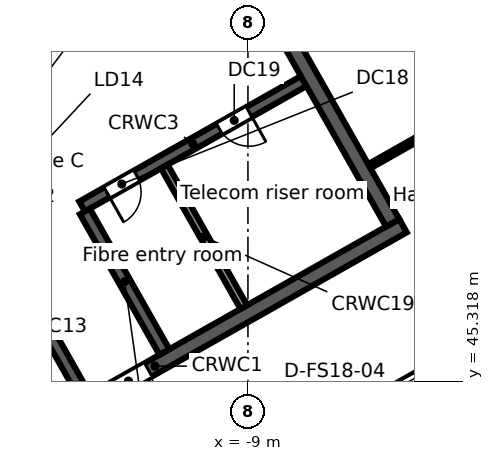
"""IFC4 building model, lengths in metres.
Left out: names, types, materials, properties, quantities, classifications, styles, units other than length and angle.
Written with IfcOpenShell. Run it as: python <this file> out.ifc"""

import sys

from ifc_helpers import new_model, si_unit, direction, frame, frame_2d, origin, place, context, subcontext, project, spatial, rectangle, extrude, element, fill, save


model = new_model("IFC4")
c1 = context("Model", 3, precision=1e-05, world=origin(), true_north=direction((0.0, 1.0)))
c2 = subcontext(c1, "Body", "Model", "MODEL_VIEW")
j1 = project(units=[si_unit("LENGTHUNIT", "METRE"), si_unit("PLANEANGLEUNIT", "RADIAN")], contexts=[c1])
p1 = place(None, origin())
s1 = spatial("IfcSite", under=j1, at=p1, CompositionType="ELEMENT")
p2 = place(p1, origin())
s2 = spatial("IfcBuilding", under=s1, at=p2, CompositionType="ELEMENT")
p3 = place(p2, frame((0.0, 0.0, 266.5)))
s3 = spatial("IfcBuildingStorey", under=s2, at=p3, CompositionType="ELEMENT", Elevation=266.5)
p4 = place(p3, frame((-58.732, 38.771, 0.0), z_axis=(0.0, 0.0, 1.0), x_axis=(0.870355615581, 0.492423702137, 0.0)))
e1 = element("IfcWall", 1, at=p4, inside=s3, PredefinedType="STANDARD", context=c2, shape_type="SweptSolid", body=[
    extrude(rectangle(XDim=64.052, YDim=0.25, at=frame_2d((32.026, 0.0))), origin(), (0.0, 0.0, 1.0), 3.52),
])
p5 = place(p4, frame((61.259, 0.0, 0.8)))
e2 = element("IfcOpeningElement", 2, at=p5, cuts=e1, PredefinedType="OPENING", context=c2, shape_type="SweptSolid", body=[
    extrude(rectangle(XDim=2.4, YDim=2.2, at=frame_2d((1.2, 1.1))), frame((0.0, 0.135, 0.0), z_axis=(0.0, -1.0, 0.0), x_axis=(1.0, 0.0, 0.0)), (0.0, 0.0, 1.0), 0.27),
])
p6 = place(p4, frame((58.216, 0.0, 0.8)))
e3 = element("IfcOpeningElement", 3, at=p6, cuts=e1, PredefinedType="OPENING", context=c2, shape_type="SweptSolid", body=[
    extrude(rectangle(XDim=2.4, YDim=2.2, at=frame_2d((1.2, 1.1))), frame((0.0, 0.135, 0.0), z_axis=(0.0, -1.0, 0.0), x_axis=(1.0, 0.0, 0.0)), (0.0, 0.0, 1.0), 0.27),
])
p7 = place(p4, frame((55.173, 0.0, 0.8)))
e4 = element("IfcOpeningElement", 4, at=p7, cuts=e1, PredefinedType="OPENING", context=c2, shape_type="SweptSolid", body=[
    extrude(rectangle(XDim=2.4, YDim=2.2, at=frame_2d((1.2, 1.1))), frame((0.0, 0.135, 0.0), z_axis=(0.0, -1.0, 0.0), x_axis=(1.0, 0.0, 0.0)), (0.0, 0.0, 1.0), 0.27),
])
p8 = place(p4, frame((52.129, 0.0, 0.8)))
e5 = element("IfcOpeningElement", 5, at=p8, cuts=e1, PredefinedType="OPENING", context=c2, shape_type="SweptSolid", body=[
    extrude(rectangle(XDim=2.4, YDim=2.2, at=frame_2d((1.2, 1.1))), frame((0.0, 0.135, 0.0), z_axis=(0.0, -1.0, 0.0), x_axis=(1.0, 0.0, 0.0)), (0.0, 0.0, 1.0), 0.27),
])
p9 = place(p4, frame((49.086, 0.0, 0.8)))
e6 = element("IfcOpeningElement", 6, at=p9, cuts=e1, PredefinedType="OPENING", context=c2, shape_type="SweptSolid", body=[
    extrude(rectangle(XDim=2.4, YDim=2.2, at=frame_2d((1.2, 1.1))), frame((0.0, 0.135, 0.0), z_axis=(0.0, -1.0, 0.0), x_axis=(1.0, 0.0, 0.0)), (0.0, 0.0, 1.0), 0.27),
])
p10 = place(p4, frame((46.043, 0.0, 0.8)))
e7 = element("IfcOpeningElement", 7, at=p10, cuts=e1, PredefinedType="OPENING", context=c2, shape_type="SweptSolid", body=[
    extrude(rectangle(XDim=2.4, YDim=2.2, at=frame_2d((1.2, 1.1))), frame((0.0, 0.135, 0.0), z_axis=(0.0, -1.0, 0.0), x_axis=(1.0, 0.0, 0.0)), (0.0, 0.0, 1.0), 0.27),
])
p11 = place(p4, frame((43.0, 0.0, 0.8)))
e8 = element("IfcOpeningElement", 8, at=p11, cuts=e1, PredefinedType="OPENING", context=c2, shape_type="SweptSolid", body=[
    extrude(rectangle(XDim=2.4, YDim=2.2, at=frame_2d((1.2, 1.1))), frame((0.0, 0.135, 0.0), z_axis=(0.0, -1.0, 0.0), x_axis=(1.0, 0.0, 0.0)), (0.0, 0.0, 1.0), 0.27),
])
p12 = place(p4, frame((39.956, 0.0, 0.8)))
e9 = element("IfcOpeningElement", 9, at=p12, cuts=e1, PredefinedType="OPENING", context=c2, shape_type="SweptSolid", body=[
    extrude(rectangle(XDim=2.4, YDim=2.2, at=frame_2d((1.2, 1.1))), frame((0.0, 0.135, 0.0), z_axis=(0.0, -1.0, 0.0), x_axis=(1.0, 0.0, 0.0)), (0.0, 0.0, 1.0), 0.27),
])
p13 = place(p4, frame((36.913, 0.0, 0.8)))
e10 = element("IfcOpeningElement", 10, at=p13, cuts=e1, PredefinedType="OPENING", context=c2, shape_type="SweptSolid", body=[
    extrude(rectangle(XDim=2.4, YDim=2.2, at=frame_2d((1.2, 1.1))), frame((0.0, 0.135, 0.0), z_axis=(0.0, -1.0, 0.0), x_axis=(1.0, 0.0, 0.0)), (0.0, 0.0, 1.0), 0.27),
])
p14 = place(p4, frame((33.87, 0.0, 0.8)))
e11 = element("IfcOpeningElement", 11, at=p14, cuts=e1, PredefinedType="OPENING", context=c2, shape_type="SweptSolid", body=[
    extrude(rectangle(XDim=2.4, YDim=2.2, at=frame_2d((1.2, 1.1))), frame((0.0, 0.135, 0.0), z_axis=(0.0, -1.0, 0.0), x_axis=(1.0, 0.0, 0.0)), (0.0, 0.0, 1.0), 0.27),
])
p15 = place(p4, frame((30.826, 0.0, 0.8)))
e12 = element("IfcOpeningElement", 12, at=p15, cuts=e1, PredefinedType="OPENING", context=c2, shape_type="SweptSolid", body=[
    extrude(rectangle(XDim=2.4, YDim=2.2, at=frame_2d((1.2, 1.1))), frame((0.0, 0.135, 0.0), z_axis=(0.0, -1.0, 0.0), x_axis=(1.0, 0.0, 0.0)), (0.0, 0.0, 1.0), 0.27),
])
p16 = place(p4, frame((27.783, 0.0, 0.8)))
e13 = element("IfcOpeningElement", 13, at=p16, cuts=e1, PredefinedType="OPENING", context=c2, shape_type="SweptSolid", body=[
    extrude(rectangle(XDim=2.4, YDim=2.2, at=frame_2d((1.2, 1.1))), frame((0.0, 0.135, 0.0), z_axis=(0.0, -1.0, 0.0), x_axis=(1.0, 0.0, 0.0)), (0.0, 0.0, 1.0), 0.27),
])
p17 = place(p4, frame((24.74, 0.0, 0.8)))
e14 = element("IfcOpeningElement", 14, at=p17, cuts=e1, PredefinedType="OPENING", context=c2, shape_type="SweptSolid", body=[
    extrude(rectangle(XDim=2.4, YDim=2.2, at=frame_2d((1.2, 1.1))), frame((0.0, 0.135, 0.0), z_axis=(0.0, -1.0, 0.0), x_axis=(1.0, 0.0, 0.0)), (0.0, 0.0, 1.0), 0.27),
])
p18 = place(p4, frame((21.696, 0.0, 0.8)))
e15 = element("IfcOpeningElement", 15, at=p18, cuts=e1, PredefinedType="OPENING", context=c2, shape_type="SweptSolid", body=[
    extrude(rectangle(XDim=2.4, YDim=2.2, at=frame_2d((1.2, 1.1))), frame((0.0, 0.135, 0.0), z_axis=(0.0, -1.0, 0.0), x_axis=(1.0, 0.0, 0.0)), (0.0, 0.0, 1.0), 0.27),
])
p19 = place(p4, frame((18.653, 0.0, 0.8)))
e16 = element("IfcOpeningElement", 16, at=p19, cuts=e1, PredefinedType="OPENING", context=c2, shape_type="SweptSolid", body=[
    extrude(rectangle(XDim=2.4, YDim=2.2, at=frame_2d((1.2, 1.1))), frame((0.0, 0.135, 0.0), z_axis=(0.0, -1.0, 0.0), x_axis=(1.0, 0.0, 0.0)), (0.0, 0.0, 1.0), 0.27),
])
p20 = place(p4, frame((15.61, 0.0, 0.8)))
e17 = element("IfcOpeningElement", 17, at=p20, cuts=e1, PredefinedType="OPENING", context=c2, shape_type="SweptSolid", body=[
    extrude(rectangle(XDim=2.4, YDim=2.2, at=frame_2d((1.2, 1.1))), frame((0.0, 0.135, 0.0), z_axis=(0.0, -1.0, 0.0), x_axis=(1.0, 0.0, 0.0)), (0.0, 0.0, 1.0), 0.27),
])
p21 = place(p4, frame((12.567, 0.0, 0.8)))
e18 = element("IfcOpeningElement", 18, at=p21, cuts=e1, PredefinedType="OPENING", context=c2, shape_type="SweptSolid", body=[
    extrude(rectangle(XDim=2.4, YDim=2.2, at=frame_2d((1.2, 1.1))), frame((0.0, 0.135, 0.0), z_axis=(0.0, -1.0, 0.0), x_axis=(1.0, 0.0, 0.0)), (0.0, 0.0, 1.0), 0.27),
])
p22 = place(p4, frame((9.523, 0.0, 0.8)))
e19 = element("IfcOpeningElement", 19, at=p22, cuts=e1, PredefinedType="OPENING", context=c2, shape_type="SweptSolid", body=[
    extrude(rectangle(XDim=2.4, YDim=2.2, at=frame_2d((1.2, 1.1))), frame((0.0, 0.135, 0.0), z_axis=(0.0, -1.0, 0.0), x_axis=(1.0, 0.0, 0.0)), (0.0, 0.0, 1.0), 0.27),
])
p23 = place(p4, frame((6.48, 0.0, 0.8)))
e20 = element("IfcOpeningElement", 20, at=p23, cuts=e1, PredefinedType="OPENING", context=c2, shape_type="SweptSolid", body=[
    extrude(rectangle(XDim=2.4, YDim=2.2, at=frame_2d((1.2, 1.1))), frame((0.0, 0.135, 0.0), z_axis=(0.0, -1.0, 0.0), x_axis=(1.0, 0.0, 0.0)), (0.0, 0.0, 1.0), 0.27),
])
p24 = place(p4, frame((3.437, 0.0, 0.8)))
e21 = element("IfcOpeningElement", 21, at=p24, cuts=e1, PredefinedType="OPENING", context=c2, shape_type="SweptSolid", body=[
    extrude(rectangle(XDim=2.4, YDim=2.2, at=frame_2d((1.2, 1.1))), frame((0.0, 0.135, 0.0), z_axis=(0.0, -1.0, 0.0), x_axis=(1.0, 0.0, 0.0)), (0.0, 0.0, 1.0), 0.27),
])
p25 = place(p4, frame((0.393, 0.0, 0.8)))
e22 = element("IfcOpeningElement", 22, at=p25, cuts=e1, PredefinedType="OPENING", context=c2, shape_type="SweptSolid", body=[
    extrude(rectangle(XDim=2.4, YDim=2.2, at=frame_2d((1.2, 1.1))), frame((0.0, 0.135, 0.0), z_axis=(0.0, -1.0, 0.0), x_axis=(1.0, 0.0, 0.0)), (0.0, 0.0, 1.0), 0.27),
])
p26 = place(p3, frame((-3.017, 46.293, 0.0), z_axis=(0.0, 0.0, 1.0), x_axis=(-0.870355474887, -0.492423950812, 0.0)))
e23 = element("IfcWall", 23, at=p26, inside=s3, PredefinedType="STANDARD", context=c2, shape_type="SweptSolid", body=[
    extrude(rectangle(XDim=40.34, YDim=0.25, at=frame_2d((20.17, 0.0))), origin(), (0.0, 0.0, 1.0), 3.52),
])
p27 = place(p26, frame((37.428, 0.0, 0.8)))
e24 = element("IfcOpeningElement", 24, at=p27, cuts=e23, PredefinedType="OPENING", context=c2, shape_type="SweptSolid", body=[
    extrude(rectangle(XDim=2.4, YDim=2.2, at=frame_2d((1.2, 1.1))), frame((0.0, 0.135, 0.0), z_axis=(0.0, -1.0, 0.0), x_axis=(1.0, 0.0, 0.0)), (0.0, 0.0, 1.0), 0.27),
])
p28 = place(p26, frame((34.372, 0.0, 0.0)))
e25 = element("IfcOpeningElement", 25, at=p28, cuts=e23, PredefinedType="OPENING", context=c2, shape_type="SweptSolid", body=[
    extrude(rectangle(XDim=1.8, YDim=2.4, at=frame_2d((0.9, 1.2))), frame((0.0, 0.135, 0.0), z_axis=(0.0, -1.0, 0.0), x_axis=(1.0, 0.0, 0.0)), (0.0, 0.0, 1.0), 0.27),
])
p29 = place(p26, frame((30.716, 0.0, 0.8)))
e26 = element("IfcOpeningElement", 26, at=p29, cuts=e23, PredefinedType="OPENING", context=c2, shape_type="SweptSolid", body=[
    extrude(rectangle(XDim=2.4, YDim=2.2, at=frame_2d((1.2, 1.1))), frame((0.0, 0.135, 0.0), z_axis=(0.0, -1.0, 0.0), x_axis=(1.0, 0.0, 0.0)), (0.0, 0.0, 1.0), 0.27),
])
p30 = place(p26, frame((27.36, 0.0, 0.8)))
e27 = element("IfcOpeningElement", 27, at=p30, cuts=e23, PredefinedType="OPENING", context=c2, shape_type="SweptSolid", body=[
    extrude(rectangle(XDim=2.4, YDim=2.2, at=frame_2d((1.2, 1.1))), frame((0.0, 0.135, 0.0), z_axis=(0.0, -1.0, 0.0), x_axis=(1.0, 0.0, 0.0)), (0.0, 0.0, 1.0), 0.27),
])
p31 = place(p26, frame((24.304, 0.0, 0.0)))
e28 = element("IfcOpeningElement", 28, at=p31, cuts=e23, PredefinedType="OPENING", context=c2, shape_type="SweptSolid", body=[
    extrude(rectangle(XDim=1.8, YDim=2.4, at=frame_2d((0.9, 1.2))), frame((0.0, 0.135, 0.0), z_axis=(0.0, -1.0, 0.0), x_axis=(1.0, 0.0, 0.0)), (0.0, 0.0, 1.0), 0.27),
])
p32 = place(p26, frame((20.648, 0.0, 0.8)))
e29 = element("IfcOpeningElement", 29, at=p32, cuts=e23, PredefinedType="OPENING", context=c2, shape_type="SweptSolid", body=[
    extrude(rectangle(XDim=2.4, YDim=2.2, at=frame_2d((1.2, 1.1))), frame((0.0, 0.135, 0.0), z_axis=(0.0, -1.0, 0.0), x_axis=(1.0, 0.0, 0.0)), (0.0, 0.0, 1.0), 0.27),
])
p33 = place(p26, frame((17.292, 0.0, 0.8)))
e30 = element("IfcOpeningElement", 30, at=p33, cuts=e23, PredefinedType="OPENING", context=c2, shape_type="SweptSolid", body=[
    extrude(rectangle(XDim=2.4, YDim=2.2, at=frame_2d((1.2, 1.1))), frame((0.0, 0.135, 0.0), z_axis=(0.0, -1.0, 0.0), x_axis=(1.0, 0.0, 0.0)), (0.0, 0.0, 1.0), 0.27),
])
p34 = place(p26, frame((14.236, 0.0, 0.0)))
e31 = element("IfcOpeningElement", 31, at=p34, cuts=e23, PredefinedType="OPENING", context=c2, shape_type="SweptSolid", body=[
    extrude(rectangle(XDim=1.8, YDim=2.4, at=frame_2d((0.9, 1.2))), frame((0.0, 0.135, 0.0), z_axis=(0.0, -1.0, 0.0), x_axis=(1.0, 0.0, 0.0)), (0.0, 0.0, 1.0), 0.27),
])
p35 = place(p26, frame((10.58, 0.0, 0.8)))
e32 = element("IfcOpeningElement", 32, at=p35, cuts=e23, PredefinedType="OPENING", context=c2, shape_type="SweptSolid", body=[
    extrude(rectangle(XDim=2.4, YDim=2.2, at=frame_2d((1.2, 1.1))), frame((0.0, 0.135, 0.0), z_axis=(0.0, -1.0, 0.0), x_axis=(1.0, 0.0, 0.0)), (0.0, 0.0, 1.0), 0.27),
])
p36 = place(p26, frame((7.224, 0.0, 0.8)))
e33 = element("IfcOpeningElement", 33, at=p36, cuts=e23, PredefinedType="OPENING", context=c2, shape_type="SweptSolid", body=[
    extrude(rectangle(XDim=2.4, YDim=2.2, at=frame_2d((1.2, 1.1))), frame((0.0, 0.135, 0.0), z_axis=(0.0, -1.0, 0.0), x_axis=(1.0, 0.0, 0.0)), (0.0, 0.0, 1.0), 0.27),
])
p37 = place(p26, frame((4.168, 0.0, 0.0)))
e34 = element("IfcOpeningElement", 34, at=p37, cuts=e23, PredefinedType="OPENING", context=c2, shape_type="SweptSolid", body=[
    extrude(rectangle(XDim=1.8, YDim=2.4, at=frame_2d((0.9, 1.2))), frame((0.0, 0.135, 0.0), z_axis=(0.0, -1.0, 0.0), x_axis=(1.0, 0.0, 0.0)), (0.0, 0.0, 1.0), 0.27),
])
p38 = place(p26, frame((0.512, 0.0, 0.8)))
e35 = element("IfcOpeningElement", 35, at=p38, cuts=e23, PredefinedType="OPENING", context=c2, shape_type="SweptSolid", body=[
    extrude(rectangle(XDim=2.4, YDim=2.2, at=frame_2d((1.2, 1.1))), frame((0.0, 0.135, 0.0), z_axis=(0.0, -1.0, 0.0), x_axis=(1.0, 0.0, 0.0)), (0.0, 0.0, 1.0), 0.27),
])
p39 = place(p3, frame((-17.975, 42.017, 0.0), z_axis=(0.0, 0.0, 1.0), x_axis=(0.87034965173, 0.492434243055, 0.0)))
e36 = element("IfcWall", 36, at=p39, inside=s3, PredefinedType="SOLIDWALL", context=c2, shape_type="SweptSolid", body=[
    extrude(rectangle(XDim=15.0, YDim=0.4, at=frame_2d((7.5, 0.0))), origin(), (0.0, 0.0, 1.0), 3.52),
])
p40 = place(p39, frame((6.1, 0.0, 0.0)))
e37 = element("IfcOpeningElement", 37, at=p40, cuts=e36, PredefinedType="OPENING", context=c2, shape_type="SweptSolid", body=[
    extrude(rectangle(XDim=1.2, YDim=2.1, at=frame_2d((0.6, 1.05))), frame((0.0, 0.21, 0.0), z_axis=(0.0, -1.0, 0.0), x_axis=(1.0, 0.0, 0.0)), (0.0, 0.0, 1.0), 0.42),
])
p41 = place(p3, frame((-13.365, 49.911, 0.0), z_axis=(0.0, 0.0, 1.0), x_axis=(0.870347618718, 0.492437836272, 0.0)))
e38 = element("IfcWall", 38, at=p41, inside=s3, PredefinedType="SOLIDWALL", context=c2, shape_type="SweptSolid", body=[
    extrude(rectangle(XDim=6.7, YDim=0.3, at=frame_2d((3.35, 0.0))), origin(), (0.0, 0.0, 1.0), 3.52),
])
p42 = place(p41, frame((0.75, 0.0, 0.0)))
e39 = element("IfcOpeningElement", 39, at=p42, cuts=e38, PredefinedType="OPENING", context=c2, shape_type="SweptSolid", body=[
    extrude(rectangle(XDim=0.9, YDim=2.1, at=frame_2d((0.45, 1.05))), frame((0.0, 0.16, 0.0), z_axis=(0.0, -1.0, 0.0), x_axis=(1.0, 0.0, 0.0)), (0.0, 0.0, 1.0), 0.32),
])
p43 = place(p41, frame((4.15, 0.0, 0.0)))
e40 = element("IfcOpeningElement", 40, at=p43, cuts=e38, PredefinedType="OPENING", context=c2, shape_type="SweptSolid", body=[
    extrude(rectangle(XDim=0.9, YDim=2.1, at=frame_2d((0.45, 1.05))), frame((0.0, 0.16, 0.0), z_axis=(0.0, -1.0, 0.0), x_axis=(1.0, 0.0, 0.0)), (0.0, 0.0, 1.0), 0.32),
])
p44 = place(p3, frame((-15.618, 53.691, 0.0), z_axis=(0.0, 0.0, 1.0), x_axis=(0.870362830851, 0.492410948978, 0.0)))
e41 = element("IfcWall", 41, at=p44, inside=s3, PredefinedType="SOLIDWALL", context=c2, shape_type="SweptSolid", body=[
    extrude(rectangle(XDim=6.8, YDim=0.3, at=frame_2d((3.4, 0.0))), origin(), (0.0, 0.0, 1.0), 3.52),
])
p45 = place(p44, frame((2.6, 0.0, 0.0)))
e42 = element("IfcOpeningElement", 42, at=p45, cuts=e41, PredefinedType="OPENING", context=c2, shape_type="SweptSolid", body=[
    extrude(rectangle(XDim=0.9, YDim=2.1, at=frame_2d((0.45, 1.05))), frame((0.0, 0.16, 0.0), z_axis=(0.0, -1.0, 0.0), x_axis=(1.0, 0.0, 0.0)), (0.0, 0.0, 1.0), 0.32),
])
p46 = place(p3, frame((-24.672, 53.854, 0.0), z_axis=(0.0, 0.0, 1.0), x_axis=(0.870353598469, 0.492427267353, 0.0)))
e43 = element("IfcWall", 43, at=p46, inside=s3, PredefinedType="SOLIDWALL", context=c2, shape_type="SweptSolid", body=[
    extrude(rectangle(XDim=15.0, YDim=0.4, at=frame_2d((7.5, 0.0))), origin(), (0.0, 0.0, 1.0), 3.52),
])
p47 = place(p3, frame((-15.379, 48.599, 0.0), z_axis=(0.0, 0.0, 1.0), x_axis=(0.492422543467, -0.870356271124, 0.0)))
e44 = element("IfcWall", 44, at=p47, inside=s3, PredefinedType="SOLIDWALL", context=c2, shape_type="SweptSolid", body=[
    extrude(rectangle(XDim=4.25, YDim=0.3, at=frame_2d((2.125, 0.0))), origin(), (0.0, 0.0, 1.0), 3.52),
])
p48 = place(p3, frame((-13.291, 49.781, 0.0), z_axis=(0.0, 0.0, 1.0), x_axis=(0.492397924348, -0.870370199454, 0.0)))
e45 = element("IfcWall", 45, at=p48, inside=s3, PredefinedType="SOLIDWALL", context=c2, shape_type="SweptSolid", body=[
    extrude(rectangle(XDim=4.25, YDim=0.3, at=frame_2d((2.125, 0.0))), origin(), (0.0, 0.0, 1.0), 3.52),
])
p49 = place(p3, frame((-11.202, 50.962, 0.0), z_axis=(0.0, 0.0, 1.0), x_axis=(0.492441437811, -0.870345580977, 0.0)))
e46 = element("IfcWall", 46, at=p49, inside=s3, PredefinedType="PARTITIONING", context=c2, shape_type="SweptSolid", body=[
    extrude(rectangle(XDim=4.25, YDim=0.2, at=frame_2d((2.125, 0.0))), origin(), (0.0, 0.0, 1.0), 3.52),
])
p50 = place(p3, frame((-11.692, 60.968, 0.0), z_axis=(0.0, 0.0, 1.0), x_axis=(0.492421663121, -0.870356769198, 0.0)))
e47 = element("IfcWall", 47, at=p50, inside=s3, PredefinedType="SOLIDWALL", context=c2, shape_type="SweptSolid", body=[
    extrude(rectangle(XDim=13.2, YDim=0.4, at=frame_2d((6.6, 0.0))), origin(), (0.0, 0.0, 1.0), 3.52),
])
p51 = place(p3, frame((-5.806, 50.97, 0.0), z_axis=(0.0, 0.0, 1.0), x_axis=(0.870355163327, 0.492424501492, 0.0)))
e48 = element("IfcWall", 48, at=p51, inside=s3, PredefinedType="PARTITIONING", context=c2, shape_type="SweptSolid", body=[
    extrude(rectangle(XDim=6.527, YDim=0.125, at=frame_2d((3.264, 0.0))), origin(), (0.0, 0.0, 1.0), 2.8),
])
p52 = place(p51, frame((2.7, 0.0, 0.0)))
e49 = element("IfcOpeningElement", 49, at=p52, cuts=e48, PredefinedType="OPENING", context=c2, shape_type="SweptSolid", body=[
    extrude(rectangle(XDim=0.9, YDim=2.1, at=frame_2d((0.45, 1.05))), frame((0.0, 0.073, 0.0), z_axis=(0.0, -1.0, 0.0), x_axis=(1.0, 0.0, 0.0)), (0.0, 0.0, 1.0), 0.145),
])
p53 = place(p38, origin())
e50 = element("IfcWindow", 50, at=p53, inside=s3, PartitioningType="SINGLE_PANEL", PredefinedType="WINDOW", context=c2, shape_type="SweptSolid", body=[
    extrude(rectangle(XDim=2.4, YDim=2.2, at=frame_2d((1.2, 1.1))), frame((0.0, 0.03, 0.0), z_axis=(0.0, -1.0, 0.0), x_axis=(1.0, 0.0, 0.0)), (0.0, 0.0, 1.0), 0.06),
])
fill(e35, e50)
p54 = place(p40, frame((1.2, 0.0, 0.0), z_axis=(0.0, 0.0, 1.0), x_axis=(-1.0, 0.0, 0.0)))
e51 = element("IfcDoor", 51, at=p54, inside=s3, OperationType="SINGLE_SWING_RIGHT", PredefinedType="DOOR", context=c2, shape_type="SweptSolid", body=[
    extrude(rectangle(XDim=1.2, YDim=2.1, at=frame_2d((0.6, 1.05))), frame((0.0, 0.025, 0.0), z_axis=(0.0, -1.0, 0.0), x_axis=(1.0, 0.0, 0.0)), (0.0, 0.0, 1.0), 0.05),
])
fill(e37, e51)
p55 = place(p42, frame((0.9, 0.0, 0.0), z_axis=(0.0, 0.0, 1.0), x_axis=(-1.0, 0.0, 0.0)))
e52 = element("IfcDoor", 52, at=p55, inside=s3, OperationType="SINGLE_SWING_RIGHT", PredefinedType="DOOR", context=c2, shape_type="SweptSolid", body=[
    extrude(rectangle(XDim=0.9, YDim=2.1, at=frame_2d((0.45, 1.05))), frame((0.0, 0.025, 0.0), z_axis=(0.0, -1.0, 0.0), x_axis=(1.0, 0.0, 0.0)), (0.0, 0.0, 1.0), 0.05),
])
fill(e39, e52)
p56 = place(p43, frame((0.9, 0.0, 0.0), z_axis=(0.0, 0.0, 1.0), x_axis=(-1.0, 0.0, 0.0)))
e53 = element("IfcDoor", 53, at=p56, inside=s3, OperationType="SINGLE_SWING_LEFT", PredefinedType="DOOR", context=c2, shape_type="SweptSolid", body=[
    extrude(rectangle(XDim=0.9, YDim=2.1, at=frame_2d((0.45, 1.05))), frame((0.0, 0.025, 0.0), z_axis=(0.0, -1.0, 0.0), x_axis=(1.0, 0.0, 0.0)), (0.0, 0.0, 1.0), 0.05),
])
fill(e40, e53)
save(model, sys.argv[1])
